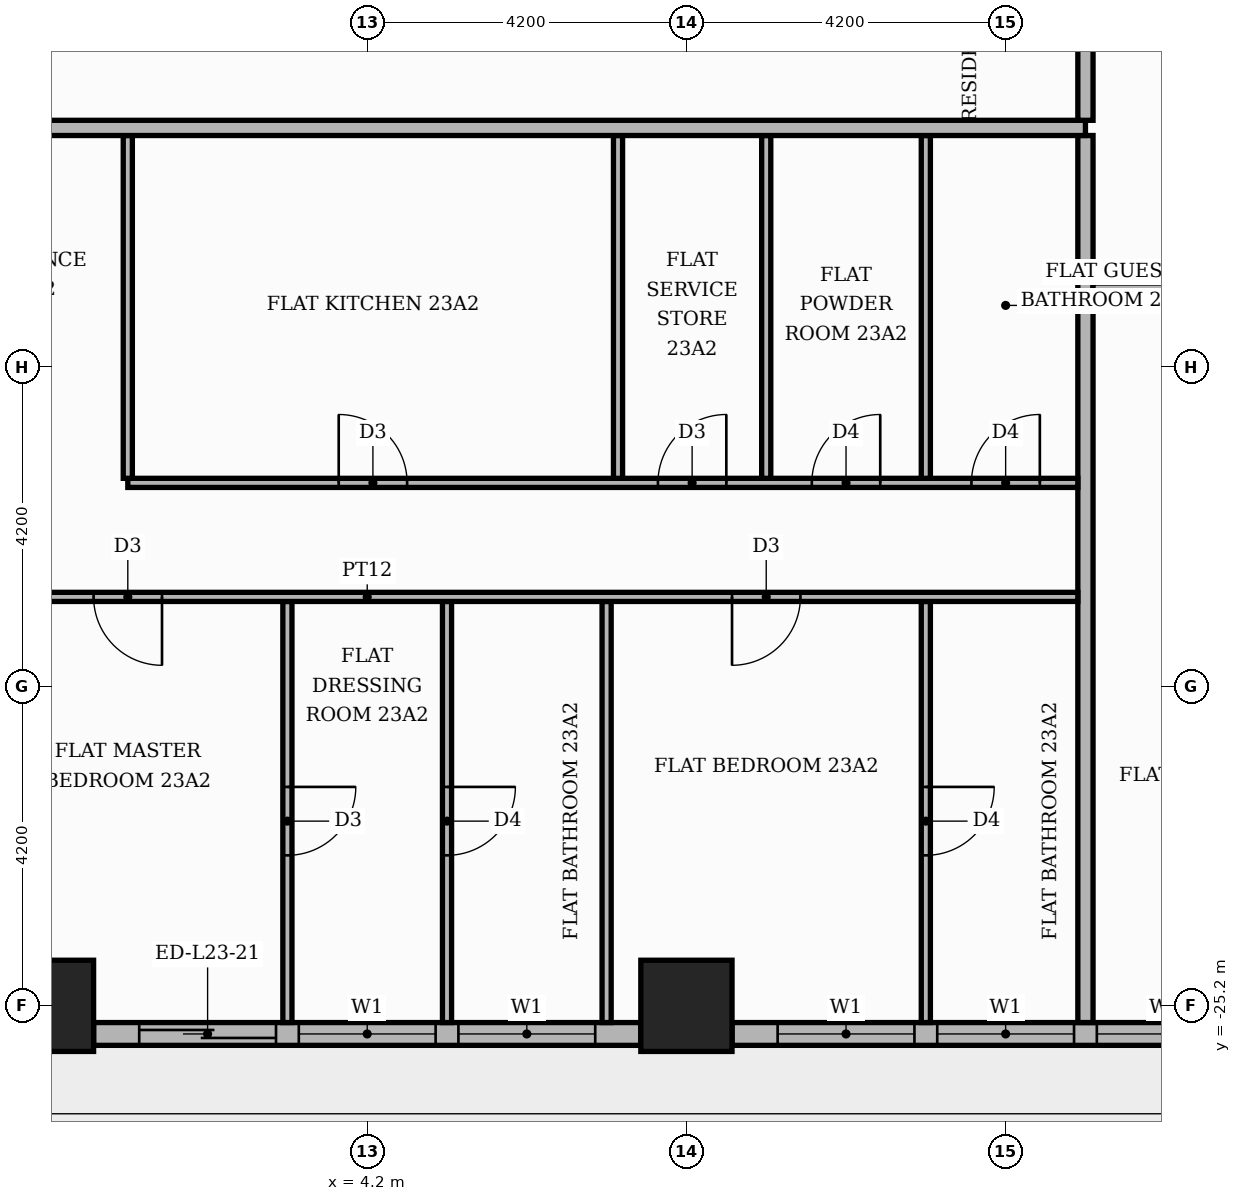
"""IFC4 building model, lengths in metres.
Left out: names, types, materials, properties, quantities, classifications, styles, units other than length and angle.
Written with IfcOpenShell. Run it as: python <this file> out.ifc"""

import sys

from ifc_helpers import new_model, si_unit, direction, frame, frame_2d, origin, origin_2d, place, context, subcontext, project, spatial, rectangle, extrude, element, fill, save


model = new_model("IFC4")
c1 = context("Model", 3, precision=1e-05, world=origin(), true_north=direction((0.0, 1.0)))
c2 = subcontext(c1, "Body", "Model", "MODEL_VIEW")
j1 = project(units=[si_unit("LENGTHUNIT", "METRE"), si_unit("PLANEANGLEUNIT", "RADIAN")], contexts=[c1])
p1 = place(None, origin())
s1 = spatial("IfcSite", under=j1, at=p1, CompositionType="ELEMENT")
p2 = place(p1, origin())
s2 = spatial("IfcBuilding", under=s1, at=p2, CompositionType="ELEMENT")
p3 = place(p2, frame((0.0, 0.0, 98.7)))
s3 = spatial("IfcBuildingStorey", under=s2, at=p3, CompositionType="ELEMENT", Elevation=98.7)
for number, where, z_axis, x_axis in (
    (1, (0.0, -25.2, 0.0), (0.0, 0.0, 1.0), (1.0, 0.0, 0.0)),
    (2, (8.4, -25.2, 0.0), (0.0, 0.0, 1.0), (1.0, 0.0, 0.0)),
):
    element("IfcColumn", number, at=place(p3, frame(where, z_axis=z_axis, x_axis=x_axis)), inside=s3, PredefinedType="COLUMN", context=c2, shape_type="SweptSolid", body=[
        extrude(rectangle(XDim=1.2, YDim=1.2, at=origin_2d()), origin(), (0.0, 0.0, 1.0), 3.9),
    ])
p4 = place(p3, frame((0.6, -25.57, 0.0), z_axis=(0.0, 0.0, 1.0), x_axis=(1.0, 0.0, 0.0)))
e3 = element("IfcWall", 3, at=p4, inside=s3, PredefinedType="STANDARD", context=c2, shape_type="SweptSolid", body=[
    extrude(rectangle(XDim=7.2, YDim=0.3, at=frame_2d((3.6, 0.0))), origin(), (0.0, 0.0, 1.0), 3.48),
])
p5 = place(p4, frame((0.6, 0.0, 0.0)))
e4 = element("IfcOpeningElement", 4, at=p5, cuts=e3, PredefinedType="OPENING", context=c2, shape_type="SweptSolid", body=[
    extrude(rectangle(XDim=1.8, YDim=2.4, at=frame_2d((0.9, 1.2))), frame((0.0, 0.16, 0.0), z_axis=(0.0, -1.0, 0.0), x_axis=(1.0, 0.0, 0.0)), (0.0, 0.0, 1.0), 0.32),
])
p6 = place(p4, frame((2.7, 0.0, 0.9)))
e5 = element("IfcOpeningElement", 5, at=p6, cuts=e3, PredefinedType="OPENING", context=c2, shape_type="SweptSolid", body=[
    extrude(rectangle(XDim=1.8, YDim=2.1, at=frame_2d((0.9, 1.05))), frame((0.0, 0.16, 0.0), z_axis=(0.0, -1.0, 0.0), x_axis=(1.0, 0.0, 0.0)), (0.0, 0.0, 1.0), 0.32),
])
p7 = place(p4, frame((4.8, 0.0, 0.9)))
e6 = element("IfcOpeningElement", 6, at=p7, cuts=e3, PredefinedType="OPENING", context=c2, shape_type="SweptSolid", body=[
    extrude(rectangle(XDim=1.8, YDim=2.1, at=frame_2d((0.9, 1.05))), frame((0.0, 0.16, 0.0), z_axis=(0.0, -1.0, 0.0), x_axis=(1.0, 0.0, 0.0)), (0.0, 0.0, 1.0), 0.32),
])
p8 = place(p3, frame((9.0, -25.57, 0.0), z_axis=(0.0, 0.0, 1.0), x_axis=(1.0, 0.0, 0.0)))
e7 = element("IfcWall", 7, at=p8, inside=s3, PredefinedType="STANDARD", context=c2, shape_type="SweptSolid", body=[
    extrude(rectangle(XDim=7.2, YDim=0.3, at=frame_2d((3.6, 0.0))), origin(), (0.0, 0.0, 1.0), 3.48),
])
p9 = place(p8, frame((0.6, 0.0, 0.9)))
e8 = element("IfcOpeningElement", 8, at=p9, cuts=e7, PredefinedType="OPENING", context=c2, shape_type="SweptSolid", body=[
    extrude(rectangle(XDim=1.8, YDim=2.1, at=frame_2d((0.9, 1.05))), frame((0.0, 0.16, 0.0), z_axis=(0.0, -1.0, 0.0), x_axis=(1.0, 0.0, 0.0)), (0.0, 0.0, 1.0), 0.32),
])
p10 = place(p8, frame((2.7, 0.0, 0.9)))
e9 = element("IfcOpeningElement", 9, at=p10, cuts=e7, PredefinedType="OPENING", context=c2, shape_type="SweptSolid", body=[
    extrude(rectangle(XDim=1.8, YDim=2.1, at=frame_2d((0.9, 1.05))), frame((0.0, 0.16, 0.0), z_axis=(0.0, -1.0, 0.0), x_axis=(1.0, 0.0, 0.0)), (0.0, 0.0, 1.0), 0.32),
])
p11 = place(p8, frame((4.8, 0.0, 0.9)))
e10 = element("IfcOpeningElement", 10, at=p11, cuts=e7, PredefinedType="OPENING", context=c2, shape_type="SweptSolid", body=[
    extrude(rectangle(XDim=1.8, YDim=2.1, at=frame_2d((0.9, 1.05))), frame((0.0, 0.16, 0.0), z_axis=(0.0, -1.0, 0.0), x_axis=(1.0, 0.0, 0.0)), (0.0, 0.0, 1.0), 0.32),
])
p12 = place(p3, frame((3.15, -25.42, 0.0), z_axis=(0.0, 0.0, 1.0), x_axis=(0.0, 1.0, 0.0)))
e11 = element("IfcWall", 11, at=p12, inside=s3, PredefinedType="PARTITIONING", context=c2, shape_type="SweptSolid", body=[
    extrude(rectangle(XDim=5.54, YDim=0.12, at=frame_2d((2.77, 0.0))), origin(), (0.0, 0.0, 1.0), 3.48),
])
p13 = place(p12, frame((2.2, 0.0, 0.0)))
e12 = element("IfcOpeningElement", 12, at=p13, cuts=e11, PredefinedType="OPENING", context=c2, shape_type="SweptSolid", body=[
    extrude(rectangle(XDim=0.9, YDim=2.1, at=frame_2d((0.45, 1.05))), frame((0.0, 0.07, 0.0), z_axis=(0.0, -1.0, 0.0), x_axis=(1.0, 0.0, 0.0)), (0.0, 0.0, 1.0), 0.14),
])
p14 = place(p3, frame((5.25, -25.42, 0.0), z_axis=(0.0, 0.0, 1.0), x_axis=(0.0, 1.0, 0.0)))
e13 = element("IfcWall", 13, at=p14, inside=s3, PredefinedType="PARTITIONING", context=c2, shape_type="SweptSolid", body=[
    extrude(rectangle(XDim=5.54, YDim=0.12, at=frame_2d((2.77, 0.0))), origin(), (0.0, 0.0, 1.0), 3.48),
])
p15 = place(p14, frame((2.2, 0.0, 0.0)))
e14 = element("IfcOpeningElement", 14, at=p15, cuts=e13, PredefinedType="OPENING", context=c2, shape_type="SweptSolid", body=[
    extrude(rectangle(XDim=0.9, YDim=2.1, at=frame_2d((0.45, 1.05))), frame((0.0, 0.07, 0.0), z_axis=(0.0, -1.0, 0.0), x_axis=(1.0, 0.0, 0.0)), (0.0, 0.0, 1.0), 0.14),
])
p16 = place(p3, frame((7.35, -25.42, 0.0), z_axis=(0.0, 0.0, 1.0), x_axis=(0.0, 1.0, 0.0)))
e15 = element("IfcWall", 15, at=p16, inside=s3, PredefinedType="PARTITIONING", context=c2, shape_type="SweptSolid", body=[
    extrude(rectangle(XDim=5.54, YDim=0.12, at=frame_2d((2.77, 0.0))), origin(), (0.0, 0.0, 1.0), 3.48),
])
p17 = place(p3, frame((11.55, -25.42, 0.0), z_axis=(0.0, 0.0, 1.0), x_axis=(0.0, 1.0, 0.0)))
e16 = element("IfcWall", 16, at=p17, inside=s3, PredefinedType="PARTITIONING", context=c2, shape_type="SweptSolid", body=[
    extrude(rectangle(XDim=5.54, YDim=0.12, at=frame_2d((2.77, 0.0))), origin(), (0.0, 0.0, 1.0), 3.48),
])
p18 = place(p17, frame((2.2, 0.0, 0.0)))
e17 = element("IfcOpeningElement", 17, at=p18, cuts=e16, PredefinedType="OPENING", context=c2, shape_type="SweptSolid", body=[
    extrude(rectangle(XDim=0.9, YDim=2.1, at=frame_2d((0.45, 1.05))), frame((0.0, 0.07, 0.0), z_axis=(0.0, -1.0, 0.0), x_axis=(1.0, 0.0, 0.0)), (0.0, 0.0, 1.0), 0.14),
])
p19 = place(p3, frame((13.65, -25.42, 0.0), z_axis=(0.0, 0.0, 1.0), x_axis=(0.0, 1.0, 0.0)))
e18 = element("IfcWall", 18, at=p19, inside=s3, PredefinedType="PARTITIONING", context=c2, shape_type="SweptSolid", body=[
    extrude(rectangle(XDim=11.67, YDim=0.2, at=frame_2d((5.835, 0.0))), origin(), (0.0, 0.0, 1.0), 3.48),
])
p20 = place(p3, frame((-5.15, -19.82, 0.0), z_axis=(0.0, 0.0, 1.0), x_axis=(1.0, 0.0, 0.0)))
e19 = element("IfcWall", 19, at=p20, inside=s3, PredefinedType="PARTITIONING", context=c2, shape_type="SweptSolid", body=[
    extrude(rectangle(XDim=18.7, YDim=0.12, at=frame_2d((9.35, 0.0))), origin(), (0.0, 0.0, 1.0), 3.48),
])
p21 = place(p20, frame((1.5, 0.0, 0.0)))
e20 = element("IfcOpeningElement", 20, at=p21, cuts=e19, PredefinedType="OPENING", context=c2, shape_type="SweptSolid", body=[
    extrude(rectangle(XDim=1.0, YDim=2.1, at=frame_2d((0.5, 1.05))), frame((0.0, 0.07, 0.0), z_axis=(0.0, -1.0, 0.0), x_axis=(1.0, 0.0, 0.0)), (0.0, 0.0, 1.0), 0.14),
])
p22 = place(p20, frame((5.75, 0.0, 0.0)))
e21 = element("IfcOpeningElement", 21, at=p22, cuts=e19, PredefinedType="OPENING", context=c2, shape_type="SweptSolid", body=[
    extrude(rectangle(XDim=0.9, YDim=2.1, at=frame_2d((0.45, 1.05))), frame((0.0, 0.07, 0.0), z_axis=(0.0, -1.0, 0.0), x_axis=(1.0, 0.0, 0.0)), (0.0, 0.0, 1.0), 0.14),
])
p23 = place(p20, frame((14.15, 0.0, 0.0)))
e22 = element("IfcOpeningElement", 22, at=p23, cuts=e19, PredefinedType="OPENING", context=c2, shape_type="SweptSolid", body=[
    extrude(rectangle(XDim=0.9, YDim=2.1, at=frame_2d((0.45, 1.05))), frame((0.0, 0.07, 0.0), z_axis=(0.0, -1.0, 0.0), x_axis=(1.0, 0.0, 0.0)), (0.0, 0.0, 1.0), 0.14),
])
p24 = place(p3, frame((1.05, -18.32, 0.0), z_axis=(0.0, 0.0, 1.0), x_axis=(1.0, 0.0, 0.0)))
e23 = element("IfcWall", 23, at=p24, inside=s3, PredefinedType="PARTITIONING", context=c2, shape_type="SweptSolid", body=[
    extrude(rectangle(XDim=12.5, YDim=0.12, at=frame_2d((6.25, 0.0))), origin(), (0.0, 0.0, 1.0), 3.48),
])
p25 = place(p24, frame((2.775, 0.0, 0.0)))
e24 = element("IfcOpeningElement", 24, at=p25, cuts=e23, PredefinedType="OPENING", context=c2, shape_type="SweptSolid", body=[
    extrude(rectangle(XDim=0.9, YDim=2.1, at=frame_2d((0.45, 1.05))), frame((0.0, 0.07, 0.0), z_axis=(0.0, -1.0, 0.0), x_axis=(1.0, 0.0, 0.0)), (0.0, 0.0, 1.0), 0.14),
])
p26 = place(p24, frame((6.975, 0.0, 0.0)))
e25 = element("IfcOpeningElement", 25, at=p26, cuts=e23, PredefinedType="OPENING", context=c2, shape_type="SweptSolid", body=[
    extrude(rectangle(XDim=0.9, YDim=2.1, at=frame_2d((0.45, 1.05))), frame((0.0, 0.07, 0.0), z_axis=(0.0, -1.0, 0.0), x_axis=(1.0, 0.0, 0.0)), (0.0, 0.0, 1.0), 0.14),
])
p27 = place(p24, frame((9.0, 0.0, 0.0)))
e26 = element("IfcOpeningElement", 26, at=p27, cuts=e23, PredefinedType="OPENING", context=c2, shape_type="SweptSolid", body=[
    extrude(rectangle(XDim=0.9, YDim=2.1, at=frame_2d((0.45, 1.05))), frame((0.0, 0.07, 0.0), z_axis=(0.0, -1.0, 0.0), x_axis=(1.0, 0.0, 0.0)), (0.0, 0.0, 1.0), 0.14),
])
p28 = place(p24, frame((11.1, 0.0, 0.0)))
e27 = element("IfcOpeningElement", 27, at=p28, cuts=e23, PredefinedType="OPENING", context=c2, shape_type="SweptSolid", body=[
    extrude(rectangle(XDim=0.9, YDim=2.1, at=frame_2d((0.45, 1.05))), frame((0.0, 0.07, 0.0), z_axis=(0.0, -1.0, 0.0), x_axis=(1.0, 0.0, 0.0)), (0.0, 0.0, 1.0), 0.14),
])
for number, where, z_axis, x_axis in (
    (28, (1.05, -18.26, 0.0), (0.0, 0.0, 1.0), (0.0, 1.0, 0.0)),
    (29, (7.5, -18.26, 0.0), (0.0, 0.0, 1.0), (0.0, 1.0, 0.0)),
    (30, (9.45, -18.26, 0.0), (0.0, 0.0, 1.0), (0.0, 1.0, 0.0)),
    (31, (11.55, -18.26, 0.0), (0.0, 0.0, 1.0), (0.0, 1.0, 0.0)),
):
    element("IfcWall", number, at=place(p3, frame(where, z_axis=z_axis, x_axis=x_axis)), inside=s3, PredefinedType="PARTITIONING", context=c2, shape_type="SweptSolid", body=[
        extrude(rectangle(XDim=4.51, YDim=0.12, at=frame_2d((2.255, 0.0))), origin(), (0.0, 0.0, 1.0), 3.48),
    ])
p29 = place(p3, frame((13.75, -15.75, 0.0), z_axis=(0.0, 0.0, 1.0), x_axis=(1.0, 0.0, 0.0)))
e32 = element("IfcWall", 32, at=p29, inside=s3, PredefinedType="PARTITIONING", context=c2, shape_type="SweptSolid", body=[
    extrude(rectangle(XDim=6.37, YDim=0.12, at=frame_2d((3.185, 0.0))), origin(), (0.0, 0.0, 1.0), 3.48),
])
p30 = place(p29, frame((2.635, 0.0, 0.0)))
e33 = element("IfcOpeningElement", 33, at=p30, cuts=e32, PredefinedType="OPENING", context=c2, shape_type="SweptSolid", body=[
    extrude(rectangle(XDim=1.0, YDim=2.1, at=frame_2d((0.5, 1.05))), frame((0.0, 0.07, 0.0), z_axis=(0.0, -1.0, 0.0), x_axis=(1.0, 0.0, 0.0)), (0.0, 0.0, 1.0), 0.14),
])
p31 = place(p3, frame((-25.42, -13.65, 0.0), z_axis=(0.0, 0.0, 1.0), x_axis=(1.0, 0.0, 0.0)))
e34 = element("IfcWall", 34, at=p31, inside=s3, PredefinedType="PARTITIONING", context=c2, shape_type="SweptSolid", body=[
    extrude(rectangle(XDim=39.07, YDim=0.2, at=frame_2d((19.535, 0.0))), origin(), (0.0, 0.0, 1.0), 3.48),
])
p32 = place(p31, frame((13.32, 0.0, 0.0)))
e35 = element("IfcOpeningElement", 35, at=p32, cuts=e34, PredefinedType="OPENING", context=c2, shape_type="SweptSolid", body=[
    extrude(rectangle(XDim=1.1, YDim=2.4, at=frame_2d((0.55, 1.2))), frame((0.0, 0.11, 0.0), z_axis=(0.0, -1.0, 0.0), x_axis=(1.0, 0.0, 0.0)), (0.0, 0.0, 1.0), 0.22),
])
p33 = place(p31, frame((23.82, 0.0, 0.0)))
e36 = element("IfcOpeningElement", 36, at=p33, cuts=e34, PredefinedType="OPENING", context=c2, shape_type="SweptSolid", body=[
    extrude(rectangle(XDim=1.1, YDim=2.4, at=frame_2d((0.55, 1.2))), frame((0.0, 0.11, 0.0), z_axis=(0.0, -1.0, 0.0), x_axis=(1.0, 0.0, 0.0)), (0.0, 0.0, 1.0), 0.22),
])
p34 = place(p3, frame((13.65, -13.55, 0.0), z_axis=(0.0, 0.0, 1.0), x_axis=(0.0, 1.0, 0.0)))
e37 = element("IfcWall", 37, at=p34, inside=s3, PredefinedType="PARTITIONING", context=c2, shape_type="SweptSolid", body=[
    extrude(rectangle(XDim=8.2, YDim=0.2, at=frame_2d((4.1, 0.0))), origin(), (0.0, 0.0, 1.0), 3.48),
])
p35 = place(p34, frame((1.45, 0.0, 0.0)))
e38 = element("IfcOpeningElement", 38, at=p35, cuts=e37, PredefinedType="OPENING", context=c2, shape_type="SweptSolid", body=[
    extrude(rectangle(XDim=1.1, YDim=2.4, at=frame_2d((0.55, 1.2))), frame((0.0, 0.11, 0.0), z_axis=(0.0, -1.0, 0.0), x_axis=(1.0, 0.0, 0.0)), (0.0, 0.0, 1.0), 0.22),
])
p36 = place(p5, origin())
e39 = element("IfcDoor", 39, at=p36, inside=s3, OperationType="SLIDING_TO_LEFT", PredefinedType="DOOR", context=c2, shape_type="SweptSolid", body=[
    extrude(rectangle(XDim=1.8, YDim=2.4, at=frame_2d((0.9, 1.2))), frame((0.0, 0.025, 0.0), z_axis=(0.0, -1.0, 0.0), x_axis=(1.0, 0.0, 0.0)), (0.0, 0.0, 1.0), 0.05),
])
fill(e4, e39)
p37 = place(p6, origin())
e40 = element("IfcWindow", 40, at=p37, inside=s3, PartitioningType="SINGLE_PANEL", PredefinedType="WINDOW", context=c2, shape_type="SweptSolid", body=[
    extrude(rectangle(XDim=1.8, YDim=2.1, at=frame_2d((0.9, 1.05))), frame((0.0, 0.03, 0.0), z_axis=(0.0, -1.0, 0.0), x_axis=(1.0, 0.0, 0.0)), (0.0, 0.0, 1.0), 0.06),
])
fill(e5, e40)
p38 = place(p7, origin())
e41 = element("IfcWindow", 41, at=p38, inside=s3, PartitioningType="SINGLE_PANEL", PredefinedType="WINDOW", context=c2, shape_type="SweptSolid", body=[
    extrude(rectangle(XDim=1.8, YDim=2.1, at=frame_2d((0.9, 1.05))), frame((0.0, 0.03, 0.0), z_axis=(0.0, -1.0, 0.0), x_axis=(1.0, 0.0, 0.0)), (0.0, 0.0, 1.0), 0.06),
])
fill(e6, e41)
p39 = place(p9, origin())
e42 = element("IfcWindow", 42, at=p39, inside=s3, PartitioningType="SINGLE_PANEL", PredefinedType="WINDOW", context=c2, shape_type="SweptSolid", body=[
    extrude(rectangle(XDim=1.8, YDim=2.1, at=frame_2d((0.9, 1.05))), frame((0.0, 0.03, 0.0), z_axis=(0.0, -1.0, 0.0), x_axis=(1.0, 0.0, 0.0)), (0.0, 0.0, 1.0), 0.06),
])
fill(e8, e42)
p40 = place(p10, origin())
e43 = element("IfcWindow", 43, at=p40, inside=s3, PartitioningType="SINGLE_PANEL", PredefinedType="WINDOW", context=c2, shape_type="SweptSolid", body=[
    extrude(rectangle(XDim=1.8, YDim=2.1, at=frame_2d((0.9, 1.05))), frame((0.0, 0.03, 0.0), z_axis=(0.0, -1.0, 0.0), x_axis=(1.0, 0.0, 0.0)), (0.0, 0.0, 1.0), 0.06),
])
fill(e9, e43)
p41 = place(p11, origin())
e44 = element("IfcWindow", 44, at=p41, inside=s3, PartitioningType="SINGLE_PANEL", PredefinedType="WINDOW", context=c2, shape_type="SweptSolid", body=[
    extrude(rectangle(XDim=1.8, YDim=2.1, at=frame_2d((0.9, 1.05))), frame((0.0, 0.03, 0.0), z_axis=(0.0, -1.0, 0.0), x_axis=(1.0, 0.0, 0.0)), (0.0, 0.0, 1.0), 0.06),
])
fill(e10, e44)
p42 = place(p25, origin())
e45 = element("IfcDoor", 45, at=p42, inside=s3, OperationType="SINGLE_SWING_LEFT", PredefinedType="DOOR", context=c2, shape_type="SweptSolid", body=[
    extrude(rectangle(XDim=0.9, YDim=2.1, at=frame_2d((0.45, 1.05))), frame((0.0, 0.025, 0.0), z_axis=(0.0, -1.0, 0.0), x_axis=(1.0, 0.0, 0.0)), (0.0, 0.0, 1.0), 0.05),
])
fill(e24, e45)
p43 = place(p26, origin())
e46 = element("IfcDoor", 46, at=p43, inside=s3, OperationType="SINGLE_SWING_RIGHT", PredefinedType="DOOR", context=c2, shape_type="SweptSolid", body=[
    extrude(rectangle(XDim=0.9, YDim=2.1, at=frame_2d((0.45, 1.05))), frame((0.0, 0.025, 0.0), z_axis=(0.0, -1.0, 0.0), x_axis=(1.0, 0.0, 0.0)), (0.0, 0.0, 1.0), 0.05),
])
fill(e25, e46)
p44 = place(p27, origin())
e47 = element("IfcDoor", 47, at=p44, inside=s3, OperationType="SINGLE_SWING_RIGHT", PredefinedType="DOOR", context=c2, shape_type="SweptSolid", body=[
    extrude(rectangle(XDim=0.9, YDim=2.1, at=frame_2d((0.45, 1.05))), frame((0.0, 0.025, 0.0), z_axis=(0.0, -1.0, 0.0), x_axis=(1.0, 0.0, 0.0)), (0.0, 0.0, 1.0), 0.05),
])
fill(e26, e47)
p45 = place(p28, origin())
e48 = element("IfcDoor", 48, at=p45, inside=s3, OperationType="SINGLE_SWING_RIGHT", PredefinedType="DOOR", context=c2, shape_type="SweptSolid", body=[
    extrude(rectangle(XDim=0.9, YDim=2.1, at=frame_2d((0.45, 1.05))), frame((0.0, 0.025, 0.0), z_axis=(0.0, -1.0, 0.0), x_axis=(1.0, 0.0, 0.0)), (0.0, 0.0, 1.0), 0.05),
])
fill(e27, e48)
p46 = place(p22, frame((0.9, 0.0, 0.0), z_axis=(0.0, 0.0, 1.0), x_axis=(-1.0, 0.0, 0.0)))
e49 = element("IfcDoor", 49, at=p46, inside=s3, OperationType="SINGLE_SWING_RIGHT", PredefinedType="DOOR", context=c2, shape_type="SweptSolid", body=[
    extrude(rectangle(XDim=0.9, YDim=2.1, at=frame_2d((0.45, 1.05))), frame((0.0, 0.025, 0.0), z_axis=(0.0, -1.0, 0.0), x_axis=(1.0, 0.0, 0.0)), (0.0, 0.0, 1.0), 0.05),
])
fill(e21, e49)
p47 = place(p13, frame((0.9, 0.0, 0.0), z_axis=(0.0, 0.0, 1.0), x_axis=(-1.0, 0.0, 0.0)))
e50 = element("IfcDoor", 50, at=p47, inside=s3, OperationType="SINGLE_SWING_RIGHT", PredefinedType="DOOR", context=c2, shape_type="SweptSolid", body=[
    extrude(rectangle(XDim=0.9, YDim=2.1, at=frame_2d((0.45, 1.05))), frame((0.0, 0.025, 0.0), z_axis=(0.0, -1.0, 0.0), x_axis=(1.0, 0.0, 0.0)), (0.0, 0.0, 1.0), 0.05),
])
fill(e12, e50)
p48 = place(p15, frame((0.9, 0.0, 0.0), z_axis=(0.0, 0.0, 1.0), x_axis=(-1.0, 0.0, 0.0)))
e51 = element("IfcDoor", 51, at=p48, inside=s3, OperationType="SINGLE_SWING_RIGHT", PredefinedType="DOOR", context=c2, shape_type="SweptSolid", body=[
    extrude(rectangle(XDim=0.9, YDim=2.1, at=frame_2d((0.45, 1.05))), frame((0.0, 0.025, 0.0), z_axis=(0.0, -1.0, 0.0), x_axis=(1.0, 0.0, 0.0)), (0.0, 0.0, 1.0), 0.05),
])
fill(e14, e51)
p49 = place(p23, frame((0.9, 0.0, 0.0), z_axis=(0.0, 0.0, 1.0), x_axis=(-1.0, 0.0, 0.0)))
e52 = element("IfcDoor", 52, at=p49, inside=s3, OperationType="SINGLE_SWING_LEFT", PredefinedType="DOOR", context=c2, shape_type="SweptSolid", body=[
    extrude(rectangle(XDim=0.9, YDim=2.1, at=frame_2d((0.45, 1.05))), frame((0.0, 0.025, 0.0), z_axis=(0.0, -1.0, 0.0), x_axis=(1.0, 0.0, 0.0)), (0.0, 0.0, 1.0), 0.05),
])
fill(e22, e52)
p50 = place(p18, frame((0.9, 0.0, 0.0), z_axis=(0.0, 0.0, 1.0), x_axis=(-1.0, 0.0, 0.0)))
e53 = element("IfcDoor", 53, at=p50, inside=s3, OperationType="SINGLE_SWING_RIGHT", PredefinedType="DOOR", context=c2, shape_type="SweptSolid", body=[
    extrude(rectangle(XDim=0.9, YDim=2.1, at=frame_2d((0.45, 1.05))), frame((0.0, 0.025, 0.0), z_axis=(0.0, -1.0, 0.0), x_axis=(1.0, 0.0, 0.0)), (0.0, 0.0, 1.0), 0.05),
])
fill(e17, e53)
save(model, sys.argv[1])
